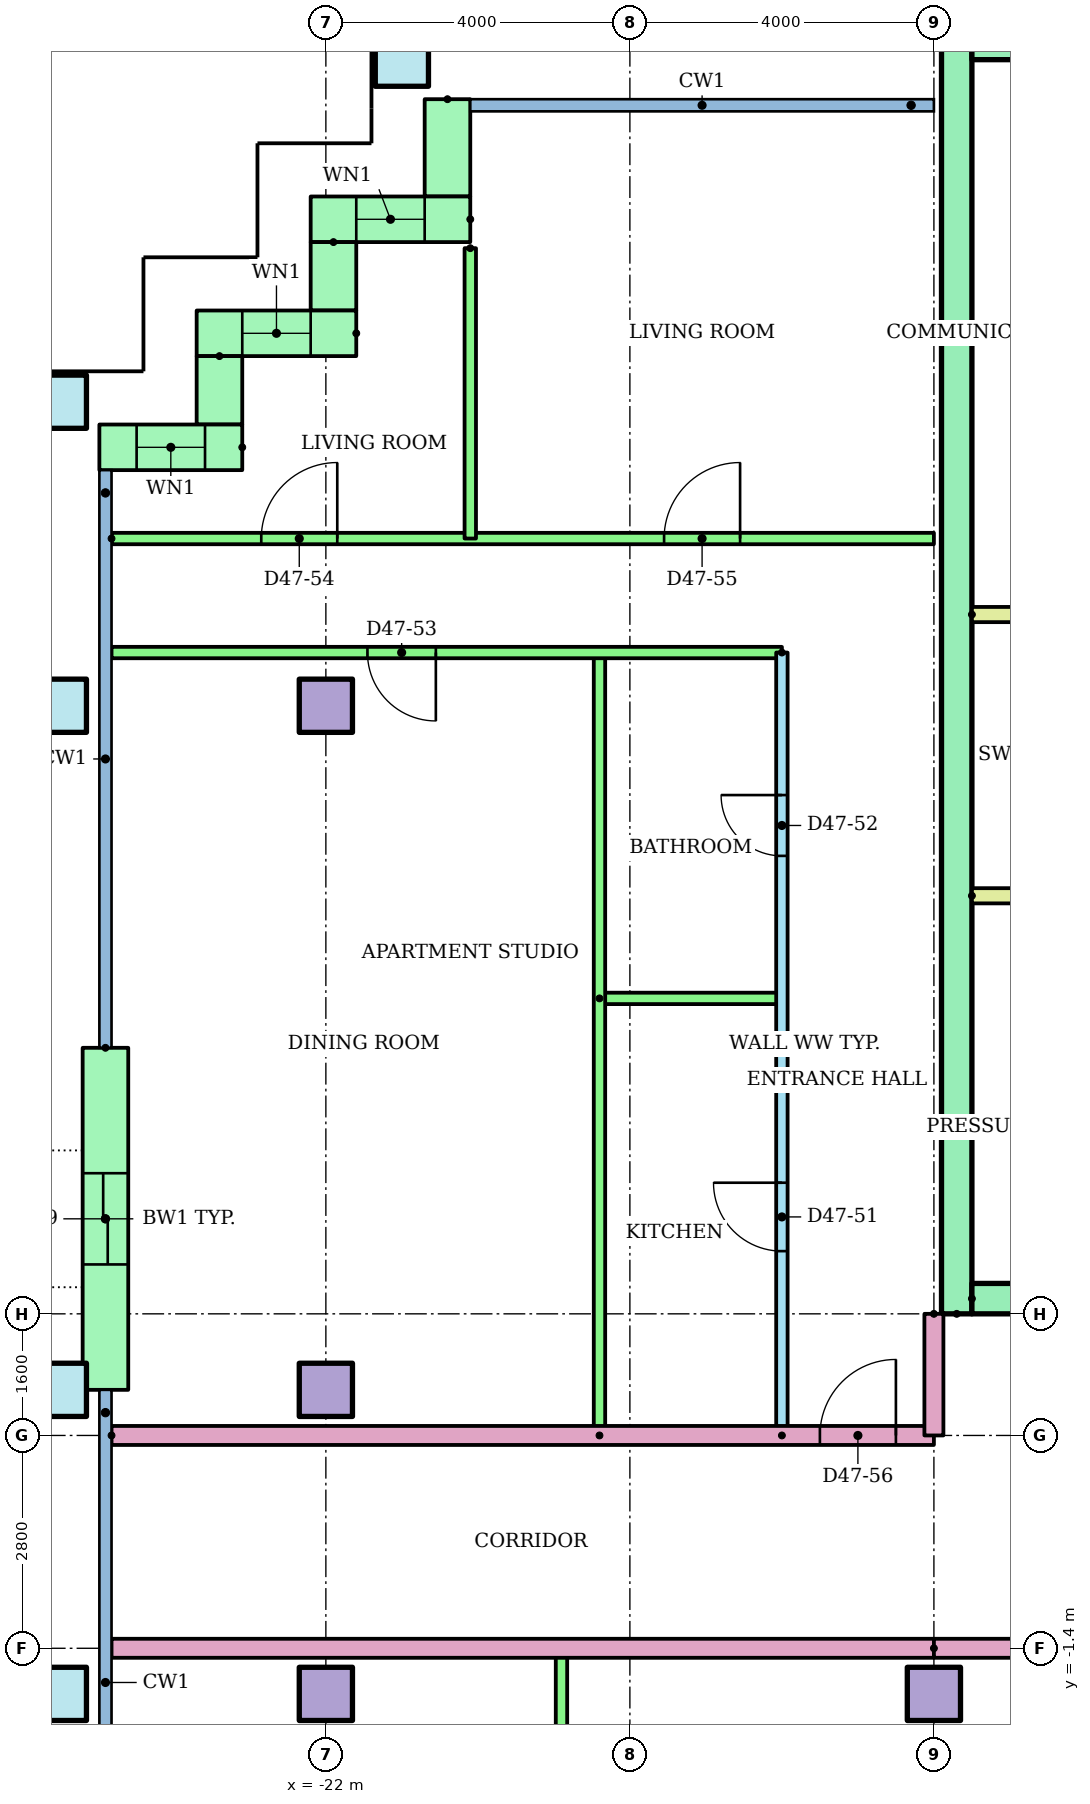
"""IFC4 building model, lengths in metres.
Left out: names, types, materials, properties, quantities, classifications, styles, units other than length and angle.
Written with IfcOpenShell. Run it as: python <this file> out.ifc"""

import sys

from ifc_helpers import new_model, si_unit, direction, frame, frame_2d, origin, origin_2d, place, context, subcontext, project, spatial, rectangle, hollow_rectangle, extrude, element, fill, save


model = new_model("IFC4")
c1 = context("Model", 3, precision=1e-05, world=origin(), true_north=direction((0.0, 1.0)))
c2 = subcontext(c1, "Body", "Model", "MODEL_VIEW")
j1 = project(units=[si_unit("LENGTHUNIT", "METRE"), si_unit("PLANEANGLEUNIT", "RADIAN")], contexts=[c1])
p1 = place(None, origin())
s1 = spatial("IfcSite", under=j1, at=p1, CompositionType="ELEMENT")
p2 = place(p1, origin())
s2 = spatial("IfcBuilding", under=s1, at=p2, CompositionType="ELEMENT")
p3 = place(p2, frame((0.0, 0.0, 181.3)))
s3 = spatial("IfcBuildingStorey", under=s2, at=p3, CompositionType="ELEMENT", Elevation=181.3)
p4 = place(p3, frame((-25.5, -2.0, 0.0)))
e1 = element("IfcColumn", 1, at=p4, inside=s3, PredefinedType="COLUMN", context=c2, shape_type="SweptSolid", body=[
    extrude(hollow_rectangle(XDim=0.7, YDim=0.7, WallThickness=0.036, at=origin_2d()), origin(), (0.0, 0.0, 1.0), 3.2),
])
for number, where in (
    (2, (-22.0, -2.0, 0.0)),
    (3, (-14.0, -2.0, 0.0)),
):
    element("IfcColumn", number, at=place(p3, frame(where)), inside=s3, PredefinedType="COLUMN", context=c2, shape_type="SweptSolid", body=[
        extrude(rectangle(XDim=0.7, YDim=0.7, at=origin_2d()), origin(), (0.0, 0.0, 1.0), 3.2),
    ])
p5 = place(p3, frame((-25.5, 2.0, 0.0)))
e4 = element("IfcColumn", 4, at=p5, inside=s3, PredefinedType="COLUMN", context=c2, shape_type="SweptSolid", body=[
    extrude(hollow_rectangle(XDim=0.7, YDim=0.7, WallThickness=0.036, at=origin_2d()), origin(), (0.0, 0.0, 1.0), 3.2),
])
p6 = place(p3, frame((-22.0, 2.0, 0.0)))
e5 = element("IfcColumn", 5, at=p6, inside=s3, PredefinedType="COLUMN", context=c2, shape_type="SweptSolid", body=[
    extrude(rectangle(XDim=0.7, YDim=0.7, at=origin_2d()), origin(), (0.0, 0.0, 1.0), 3.2),
])
p7 = place(p3, frame((-25.5, 11.0, 0.0)))
e6 = element("IfcColumn", 6, at=p7, inside=s3, PredefinedType="COLUMN", context=c2, shape_type="SweptSolid", body=[
    extrude(hollow_rectangle(XDim=0.7, YDim=0.7, WallThickness=0.036, at=origin_2d()), origin(), (0.0, 0.0, 1.0), 3.2),
])
p8 = place(p3, frame((-22.0, 11.0, 0.0)))
e7 = element("IfcColumn", 7, at=p8, inside=s3, PredefinedType="COLUMN", context=c2, shape_type="SweptSolid", body=[
    extrude(rectangle(XDim=0.7, YDim=0.7, at=origin_2d()), origin(), (0.0, 0.0, 1.0), 3.2),
])
for number, where in (
    (8, (-25.5, 15.0, 0.0)),
    (9, (-21.0, 19.5, 0.0)),
):
    element("IfcColumn", number, at=place(p3, frame(where)), inside=s3, PredefinedType="COLUMN", context=c2, shape_type="SweptSolid", body=[
        extrude(hollow_rectangle(XDim=0.7, YDim=0.7, WallThickness=0.036, at=origin_2d()), origin(), (0.0, 0.0, 1.0), 3.2),
    ])
p9 = place(p3, frame((-20.4, 18.98, 0.0), z_axis=(0.0, 0.0, 1.0), x_axis=(0.0, -1.0, 0.0)))
e10 = element("IfcWall", 10, at=p9, inside=s3, PredefinedType="STANDARD", context=c2, shape_type="SweptSolid", body=[
    extrude(rectangle(XDim=1.28, YDim=0.6, at=frame_2d((0.64, 0.0))), origin(), (0.0, 0.0, 1.0), 2.92),
])
p10 = place(p3, frame((-20.1, 17.4, 0.0), z_axis=(0.0, 0.0, 1.0), x_axis=(-1.0, 0.0, 0.0)))
e11 = element("IfcWall", 11, at=p10, inside=s3, PredefinedType="STANDARD", context=c2, shape_type="SweptSolid", body=[
    extrude(rectangle(XDim=2.1, YDim=0.6, at=frame_2d((1.05, 0.0))), origin(), (0.0, 0.0, 1.0), 2.92),
])
p11 = place(p10, frame((0.6, 0.0, 0.9)))
e12 = element("IfcOpeningElement", 12, at=p11, cuts=e11, PredefinedType="OPENING", context=c2, shape_type="SweptSolid", body=[
    extrude(rectangle(XDim=0.9, YDim=1.5, at=frame_2d((0.45, 0.75))), frame((0.0, 0.31, 0.0), z_axis=(0.0, -1.0, 0.0), x_axis=(1.0, 0.0, 0.0)), (0.0, 0.0, 1.0), 0.62),
])
p12 = place(p3, frame((-21.9, 17.1, 0.0), z_axis=(0.0, 0.0, 1.0), x_axis=(0.0, -1.0, 0.0)))
e13 = element("IfcWall", 13, at=p12, inside=s3, PredefinedType="STANDARD", context=c2, shape_type="SweptSolid", body=[
    extrude(rectangle(XDim=0.9, YDim=0.6, at=frame_2d((0.45, 0.0))), origin(), (0.0, 0.0, 1.0), 2.92),
])
p13 = place(p3, frame((-21.6, 15.9, 0.0), z_axis=(0.0, 0.0, 1.0), x_axis=(-1.0, 0.0, 0.0)))
e14 = element("IfcWall", 14, at=p13, inside=s3, PredefinedType="STANDARD", context=c2, shape_type="SweptSolid", body=[
    extrude(rectangle(XDim=2.1, YDim=0.6, at=frame_2d((1.05, 0.0))), origin(), (0.0, 0.0, 1.0), 2.92),
])
p14 = place(p13, frame((0.6, 0.0, 0.9)))
e15 = element("IfcOpeningElement", 15, at=p14, cuts=e14, PredefinedType="OPENING", context=c2, shape_type="SweptSolid", body=[
    extrude(rectangle(XDim=0.9, YDim=1.5, at=frame_2d((0.45, 0.75))), frame((0.0, 0.31, 0.0), z_axis=(0.0, -1.0, 0.0), x_axis=(1.0, 0.0, 0.0)), (0.0, 0.0, 1.0), 0.62),
])
p15 = place(p3, frame((-23.4, 15.6, 0.0), z_axis=(0.0, 0.0, 1.0), x_axis=(0.0, -1.0, 0.0)))
e16 = element("IfcWall", 16, at=p15, inside=s3, PredefinedType="STANDARD", context=c2, shape_type="SweptSolid", body=[
    extrude(rectangle(XDim=0.9, YDim=0.6, at=frame_2d((0.45, 0.0))), origin(), (0.0, 0.0, 1.0), 2.92),
])
p16 = place(p3, frame((-23.1, 14.4, 0.0), z_axis=(0.0, 0.0, 1.0), x_axis=(-1.0, 0.0, 0.0)))
e17 = element("IfcWall", 17, at=p16, inside=s3, PredefinedType="STANDARD", context=c2, shape_type="SweptSolid", body=[
    extrude(rectangle(XDim=1.88, YDim=0.6, at=frame_2d((0.94, 0.0))), origin(), (0.0, 0.0, 1.0), 2.92),
])
p17 = place(p16, frame((0.49, 0.0, 0.9)))
e18 = element("IfcOpeningElement", 18, at=p17, cuts=e17, PredefinedType="OPENING", context=c2, shape_type="SweptSolid", body=[
    extrude(rectangle(XDim=0.9, YDim=1.5, at=frame_2d((0.45, 0.75))), frame((0.0, 0.31, 0.0), z_axis=(0.0, -1.0, 0.0), x_axis=(1.0, 0.0, 0.0)), (0.0, 0.0, 1.0), 0.62),
])
p18 = place(p3, frame((-24.9, 6.5, 0.0), z_axis=(0.0, 0.0, 1.0), x_axis=(0.0, -1.0, 0.0)))
e19 = element("IfcWall", 19, at=p18, inside=s3, PredefinedType="STANDARD", context=c2, shape_type="SweptSolid", body=[
    extrude(rectangle(XDim=4.5, YDim=0.6, at=frame_2d((2.25, 0.0))), origin(), (0.0, 0.0, 1.0), 2.92),
])
p19 = place(p18, frame((1.65, 0.0, 0.0)))
e20 = element("IfcOpeningElement", 20, at=p19, cuts=e19, PredefinedType="OPENING", context=c2, shape_type="SweptSolid", body=[
    extrude(rectangle(XDim=1.2, YDim=2.1, at=frame_2d((0.6, 1.05))), frame((0.0, 0.31, 0.0), z_axis=(0.0, -1.0, 0.0), x_axis=(1.0, 0.0, 0.0)), (0.0, 0.0, 1.0), 0.62),
])
p20 = place(p3, frame((-13.7, 3.0, 0.0), z_axis=(0.0, 0.0, 1.0), x_axis=(0.0, 1.0, 0.0)))
e21 = element("IfcWall", 21, at=p20, inside=s3, PredefinedType="SHEAR", context=c2, shape_type="SweptSolid", body=[
    extrude(rectangle(XDim=17.0, YDim=0.4, at=frame_2d((8.5, 0.0))), origin(), (0.0, 0.0, 1.0), 2.92),
])
p21 = place(p3, frame((-13.5, 19.7, 0.0)))
e22 = element("IfcWall", 22, at=p21, inside=s3, PredefinedType="SHEAR", context=c2, shape_type="SweptSolid", body=[
    extrude(rectangle(XDim=27.0, YDim=0.4, at=frame_2d((13.5, 0.0))), origin(), (0.0, 0.0, 1.0), 2.92),
])
p22 = place(p3, frame((-13.5, 3.2, 0.0)))
e23 = element("IfcWall", 23, at=p22, inside=s3, PredefinedType="SHEAR", context=c2, shape_type="SweptSolid", body=[
    extrude(rectangle(XDim=27.0, YDim=0.4, at=frame_2d((13.5, 0.0))), origin(), (0.0, 0.0, 1.0), 2.92),
])
p23 = place(p22, frame((22.083, 0.0, 0.0)))
e24 = element("IfcOpeningElement", 24, at=p23, cuts=e23, PredefinedType="OPENING", context=c2, shape_type="SweptSolid", body=[
    extrude(rectangle(XDim=1.1, YDim=2.1, at=frame_2d((0.55, 1.05))), frame((0.0, 0.21, 0.0), z_axis=(0.0, -1.0, 0.0), x_axis=(1.0, 0.0, 0.0)), (0.0, 0.0, 1.0), 0.42),
])
p24 = place(p22, frame((25.128, 0.0, 0.0)))
e25 = element("IfcOpeningElement", 25, at=p24, cuts=e23, PredefinedType="OPENING", context=c2, shape_type="SweptSolid", body=[
    extrude(rectangle(XDim=1.1, YDim=2.1, at=frame_2d((0.55, 1.05))), frame((0.0, 0.21, 0.0), z_axis=(0.0, -1.0, 0.0), x_axis=(1.0, 0.0, 0.0)), (0.0, 0.0, 1.0), 0.42),
])
p25 = place(p22, frame((12.6, 0.0, 0.0)))
e26 = element("IfcOpeningElement", 26, at=p25, cuts=e23, PredefinedType="OPENING", context=c2, shape_type="SweptSolid", body=[
    extrude(rectangle(XDim=1.8, YDim=2.1, at=frame_2d((0.9, 1.05))), frame((0.0, 0.21, 0.0), z_axis=(0.0, -1.0, 0.0), x_axis=(1.0, 0.0, 0.0)), (0.0, 0.0, 1.0), 0.42),
])
for number, where in (
    (27, (-13.5, 8.5, 0.0)),
    (28, (-13.5, 12.2, 0.0)),
):
    element("IfcWall", number, at=place(p3, frame(where)), inside=s3, PredefinedType="PARTITIONING", context=c2, shape_type="SweptSolid", body=[
        extrude(rectangle(XDim=3.9, YDim=0.2, at=frame_2d((1.95, 0.0))), origin(), (0.0, 0.0, 1.0), 2.92),
    ])
p26 = place(p3, frame((-18.9, -9.3, 0.0), z_axis=(0.0, 0.0, 1.0), x_axis=(0.0, 1.0, 0.0)))
e29 = element("IfcWall", 29, at=p26, inside=s3, PredefinedType="PARTITIONING", context=c2, shape_type="SweptSolid", body=[
    extrude(rectangle(XDim=7.9, YDim=0.15, at=frame_2d((3.95, 0.0))), origin(), (0.0, 0.0, 1.0), 2.4),
])
p27 = place(p3, frame((-14.0, -1.4, 0.0), z_axis=(0.0, 0.0, 1.0), x_axis=(-1.0, 0.0, 0.0)))
e30 = element("IfcWall", 30, at=p27, inside=s3, PredefinedType="PARTITIONING", context=c2, shape_type="SweptSolid", body=[
    extrude(rectangle(XDim=10.82, YDim=0.25, at=frame_2d((5.41, 0.0))), origin(), (0.0, 0.0, 1.0), 2.4),
])
p28 = place(p3, frame((-16.0, 1.4, 0.0), z_axis=(0.0, 0.0, 1.0), x_axis=(0.0, 1.0, 0.0)))
e31 = element("IfcWall", 31, at=p28, inside=s3, PredefinedType="PARTITIONING", context=c2, shape_type="SweptSolid", body=[
    extrude(rectangle(XDim=10.3, YDim=0.15, at=frame_2d((5.15, 0.0))), origin(), (0.0, 0.0, 1.0), 2.4),
])
p29 = place(p28, frame((2.425, 0.0, 0.0)))
e32 = element("IfcOpeningElement", 32, at=p29, cuts=e31, PredefinedType="OPENING", context=c2, shape_type="SweptSolid", body=[
    extrude(rectangle(XDim=0.9, YDim=2.1, at=frame_2d((0.45, 1.05))), frame((0.0, 0.085, 0.0), z_axis=(0.0, -1.0, 0.0), x_axis=(1.0, 0.0, 0.0)), (0.0, 0.0, 1.0), 0.17),
])
p30 = place(p28, frame((7.625, 0.0, 0.0)))
e33 = element("IfcOpeningElement", 33, at=p30, cuts=e31, PredefinedType="OPENING", context=c2, shape_type="SweptSolid", body=[
    extrude(rectangle(XDim=0.8, YDim=2.1, at=frame_2d((0.4, 1.05))), frame((0.0, 0.085, 0.0), z_axis=(0.0, -1.0, 0.0), x_axis=(1.0, 0.0, 0.0)), (0.0, 0.0, 1.0), 0.17),
])
p31 = place(p3, frame((-18.4, 7.15, 0.0)))
e34 = element("IfcWall", 34, at=p31, inside=s3, PredefinedType="PARTITIONING", context=c2, shape_type="SweptSolid", body=[
    extrude(rectangle(XDim=2.4, YDim=0.15, at=frame_2d((1.2, 0.0))), origin(), (0.0, 0.0, 1.0), 2.4),
])
p32 = place(p3, frame((-18.4, 1.4, 0.0), z_axis=(0.0, 0.0, 1.0), x_axis=(0.0, 1.0, 0.0)))
e35 = element("IfcWall", 35, at=p32, inside=s3, PredefinedType="PARTITIONING", context=c2, shape_type="SweptSolid", body=[
    extrude(rectangle(XDim=10.3, YDim=0.15, at=frame_2d((5.15, 0.0))), origin(), (0.0, 0.0, 1.0), 2.4),
])
p33 = place(p3, frame((-16.0, 11.7, 0.0), z_axis=(0.0, 0.0, 1.0), x_axis=(-1.0, 0.0, 0.0)))
e36 = element("IfcWall", 36, at=p33, inside=s3, PredefinedType="PARTITIONING", context=c2, shape_type="SweptSolid", body=[
    extrude(rectangle(XDim=8.82, YDim=0.15, at=frame_2d((4.41, 0.0))), origin(), (0.0, 0.0, 1.0), 2.4),
])
p34 = place(p33, frame((4.553, 0.0, 0.0)))
e37 = element("IfcOpeningElement", 37, at=p34, cuts=e36, PredefinedType="OPENING", context=c2, shape_type="SweptSolid", body=[
    extrude(rectangle(XDim=0.9, YDim=2.1, at=frame_2d((0.45, 1.05))), frame((0.0, 0.085, 0.0), z_axis=(0.0, -1.0, 0.0), x_axis=(1.0, 0.0, 0.0)), (0.0, 0.0, 1.0), 0.17),
])
p35 = place(p3, frame((-24.82, 13.2, 0.0)))
e38 = element("IfcWall", 38, at=p35, inside=s3, PredefinedType="PARTITIONING", context=c2, shape_type="SweptSolid", body=[
    extrude(rectangle(XDim=10.82, YDim=0.15, at=frame_2d((5.41, 0.0))), origin(), (0.0, 0.0, 1.0), 2.4),
])
p36 = place(p35, frame((1.97, 0.0, 0.0)))
e39 = element("IfcOpeningElement", 39, at=p36, cuts=e38, PredefinedType="OPENING", context=c2, shape_type="SweptSolid", body=[
    extrude(rectangle(XDim=1.0, YDim=2.1, at=frame_2d((0.5, 1.05))), frame((0.0, 0.085, 0.0), z_axis=(0.0, -1.0, 0.0), x_axis=(1.0, 0.0, 0.0)), (0.0, 0.0, 1.0), 0.17),
])
p37 = place(p35, frame((7.27, 0.0, 0.0)))
e40 = element("IfcOpeningElement", 40, at=p37, cuts=e38, PredefinedType="OPENING", context=c2, shape_type="SweptSolid", body=[
    extrude(rectangle(XDim=1.0, YDim=2.1, at=frame_2d((0.5, 1.05))), frame((0.0, 0.085, 0.0), z_axis=(0.0, -1.0, 0.0), x_axis=(1.0, 0.0, 0.0)), (0.0, 0.0, 1.0), 0.17),
])
p38 = place(p3, frame((-20.1, 17.02, 0.0), z_axis=(0.0, 0.0, 1.0), x_axis=(0.0, -1.0, 0.0)))
e41 = element("IfcWall", 41, at=p38, inside=s3, PredefinedType="PARTITIONING", context=c2, shape_type="SweptSolid", body=[
    extrude(rectangle(XDim=3.82, YDim=0.15, at=frame_2d((1.91, 0.0))), origin(), (0.0, 0.0, 1.0), 2.4),
])
p39 = place(p3, frame((-24.82, 1.4, 0.0)))
e42 = element("IfcWall", 42, at=p39, inside=s3, PredefinedType="PARTITIONING", context=c2, shape_type="SweptSolid", body=[
    extrude(rectangle(XDim=10.82, YDim=0.25, at=frame_2d((5.41, 0.0))), origin(), (0.0, 0.0, 1.0), 2.4),
])
p40 = place(p39, frame((9.32, 0.0, 0.0)))
e43 = element("IfcOpeningElement", 43, at=p40, cuts=e42, PredefinedType="OPENING", context=c2, shape_type="SweptSolid", body=[
    extrude(rectangle(XDim=1.0, YDim=2.1, at=frame_2d((0.5, 1.05))), frame((0.0, 0.135, 0.0), z_axis=(0.0, -1.0, 0.0), x_axis=(1.0, 0.0, 0.0)), (0.0, 0.0, 1.0), 0.27),
])
p41 = place(p3, frame((14.0, -1.4, 0.0), z_axis=(0.0, 0.0, 1.0), x_axis=(-1.0, 0.0, 0.0)))
e44 = element("IfcWall", 44, at=p41, inside=s3, PredefinedType="PARTITIONING", context=c2, shape_type="SweptSolid", body=[
    extrude(rectangle(XDim=28.0, YDim=0.25, at=frame_2d((14.0, 0.0))), origin(), (0.0, 0.0, 1.0), 2.4),
])
p42 = place(p41, frame((12.547, 0.0, 0.0)))
e45 = element("IfcOpeningElement", 45, at=p42, cuts=e44, PredefinedType="OPENING", context=c2, shape_type="SweptSolid", body=[
    extrude(rectangle(XDim=1.0, YDim=2.1, at=frame_2d((0.5, 1.05))), frame((0.0, 0.135, 0.0), z_axis=(0.0, -1.0, 0.0), x_axis=(1.0, 0.0, 0.0)), (0.0, 0.0, 1.0), 0.27),
])
p43 = place(p41, frame((10.453, 0.0, 0.0)))
e46 = element("IfcOpeningElement", 46, at=p43, cuts=e44, PredefinedType="OPENING", context=c2, shape_type="SweptSolid", body=[
    extrude(rectangle(XDim=1.0, YDim=2.1, at=frame_2d((0.5, 1.05))), frame((0.0, 0.135, 0.0), z_axis=(0.0, -1.0, 0.0), x_axis=(1.0, 0.0, 0.0)), (0.0, 0.0, 1.0), 0.27),
])
p44 = place(p3, frame((-14.0, 3.0, 0.0), z_axis=(0.0, 0.0, 1.0), x_axis=(0.0, -1.0, 0.0)))
e47 = element("IfcWall", 47, at=p44, inside=s3, PredefinedType="PARTITIONING", context=c2, shape_type="SweptSolid", body=[
    extrude(rectangle(XDim=1.6, YDim=0.25, at=frame_2d((0.8, 0.0))), origin(), (0.0, 0.0, 1.0), 2.4),
])
p45 = place(p11, origin())
e48 = element("IfcWindow", 48, at=p45, inside=s3, PartitioningType="SINGLE_PANEL", PredefinedType="WINDOW", context=c2, shape_type="SweptSolid", body=[
    extrude(rectangle(XDim=0.9, YDim=1.5, at=frame_2d((0.45, 0.75))), frame((0.0, 0.03, 0.0), z_axis=(0.0, -1.0, 0.0), x_axis=(1.0, 0.0, 0.0)), (0.0, 0.0, 1.0), 0.06),
])
fill(e12, e48)
p46 = place(p14, origin())
e49 = element("IfcWindow", 49, at=p46, inside=s3, PartitioningType="SINGLE_PANEL", PredefinedType="WINDOW", context=c2, shape_type="SweptSolid", body=[
    extrude(rectangle(XDim=0.9, YDim=1.5, at=frame_2d((0.45, 0.75))), frame((0.0, 0.03, 0.0), z_axis=(0.0, -1.0, 0.0), x_axis=(1.0, 0.0, 0.0)), (0.0, 0.0, 1.0), 0.06),
])
fill(e15, e49)
p47 = place(p17, origin())
e50 = element("IfcWindow", 50, at=p47, inside=s3, PartitioningType="SINGLE_PANEL", PredefinedType="WINDOW", context=c2, shape_type="SweptSolid", body=[
    extrude(rectangle(XDim=0.9, YDim=1.5, at=frame_2d((0.45, 0.75))), frame((0.0, 0.03, 0.0), z_axis=(0.0, -1.0, 0.0), x_axis=(1.0, 0.0, 0.0)), (0.0, 0.0, 1.0), 0.06),
])
fill(e18, e50)
p48 = place(p29, origin())
e51 = element("IfcDoor", 51, at=p48, inside=s3, OperationType="SINGLE_SWING_RIGHT", PredefinedType="DOOR", context=c2, shape_type="SweptSolid", body=[
    extrude(rectangle(XDim=0.9, YDim=2.1, at=frame_2d((0.45, 1.05))), frame((0.0, 0.025, 0.0), z_axis=(0.0, -1.0, 0.0), x_axis=(1.0, 0.0, 0.0)), (0.0, 0.0, 1.0), 0.05),
])
fill(e32, e51)
p49 = place(p30, origin())
e52 = element("IfcDoor", 52, at=p49, inside=s3, OperationType="SINGLE_SWING_RIGHT", PredefinedType="DOOR", context=c2, shape_type="SweptSolid", body=[
    extrude(rectangle(XDim=0.8, YDim=2.1, at=frame_2d((0.4, 1.05))), frame((0.0, 0.025, 0.0), z_axis=(0.0, -1.0, 0.0), x_axis=(1.0, 0.0, 0.0)), (0.0, 0.0, 1.0), 0.05),
])
fill(e33, e52)
p50 = place(p34, origin())
e53 = element("IfcDoor", 53, at=p50, inside=s3, OperationType="SINGLE_SWING_LEFT", PredefinedType="DOOR", context=c2, shape_type="SweptSolid", body=[
    extrude(rectangle(XDim=0.9, YDim=2.1, at=frame_2d((0.45, 1.05))), frame((0.0, 0.025, 0.0), z_axis=(0.0, -1.0, 0.0), x_axis=(1.0, 0.0, 0.0)), (0.0, 0.0, 1.0), 0.05),
])
fill(e37, e53)
p51 = place(p36, origin())
e54 = element("IfcDoor", 54, at=p51, inside=s3, OperationType="SINGLE_SWING_RIGHT", PredefinedType="DOOR", context=c2, shape_type="SweptSolid", body=[
    extrude(rectangle(XDim=1.0, YDim=2.1, at=frame_2d((0.5, 1.05))), frame((0.0, 0.025, 0.0), z_axis=(0.0, -1.0, 0.0), x_axis=(1.0, 0.0, 0.0)), (0.0, 0.0, 1.0), 0.05),
])
fill(e39, e54)
p52 = place(p37, origin())
e55 = element("IfcDoor", 55, at=p52, inside=s3, OperationType="SINGLE_SWING_RIGHT", PredefinedType="DOOR", context=c2, shape_type="SweptSolid", body=[
    extrude(rectangle(XDim=1.0, YDim=2.1, at=frame_2d((0.5, 1.05))), frame((0.0, 0.025, 0.0), z_axis=(0.0, -1.0, 0.0), x_axis=(1.0, 0.0, 0.0)), (0.0, 0.0, 1.0), 0.05),
])
fill(e40, e55)
p53 = place(p40, origin())
e56 = element("IfcDoor", 56, at=p53, inside=s3, OperationType="SINGLE_SWING_RIGHT", PredefinedType="DOOR", context=c2, shape_type="SweptSolid", body=[
    extrude(rectangle(XDim=1.0, YDim=2.1, at=frame_2d((0.5, 1.05))), frame((0.0, 0.025, 0.0), z_axis=(0.0, -1.0, 0.0), x_axis=(1.0, 0.0, 0.0)), (0.0, 0.0, 1.0), 0.05),
])
fill(e43, e56)
p54 = place(p19, origin())
e57 = element("IfcDoor", 57, at=p54, inside=s3, OperationType="SLIDING_TO_LEFT", PredefinedType="DOOR", context=c2, shape_type="SweptSolid", body=[
    extrude(rectangle(XDim=1.2, YDim=2.1, at=frame_2d((0.6, 1.05))), frame((0.0, 0.025, 0.0), z_axis=(0.0, -1.0, 0.0), x_axis=(1.0, 0.0, 0.0)), (0.0, 0.0, 1.0), 0.05),
])
fill(e20, e57)
save(model, sys.argv[1])
